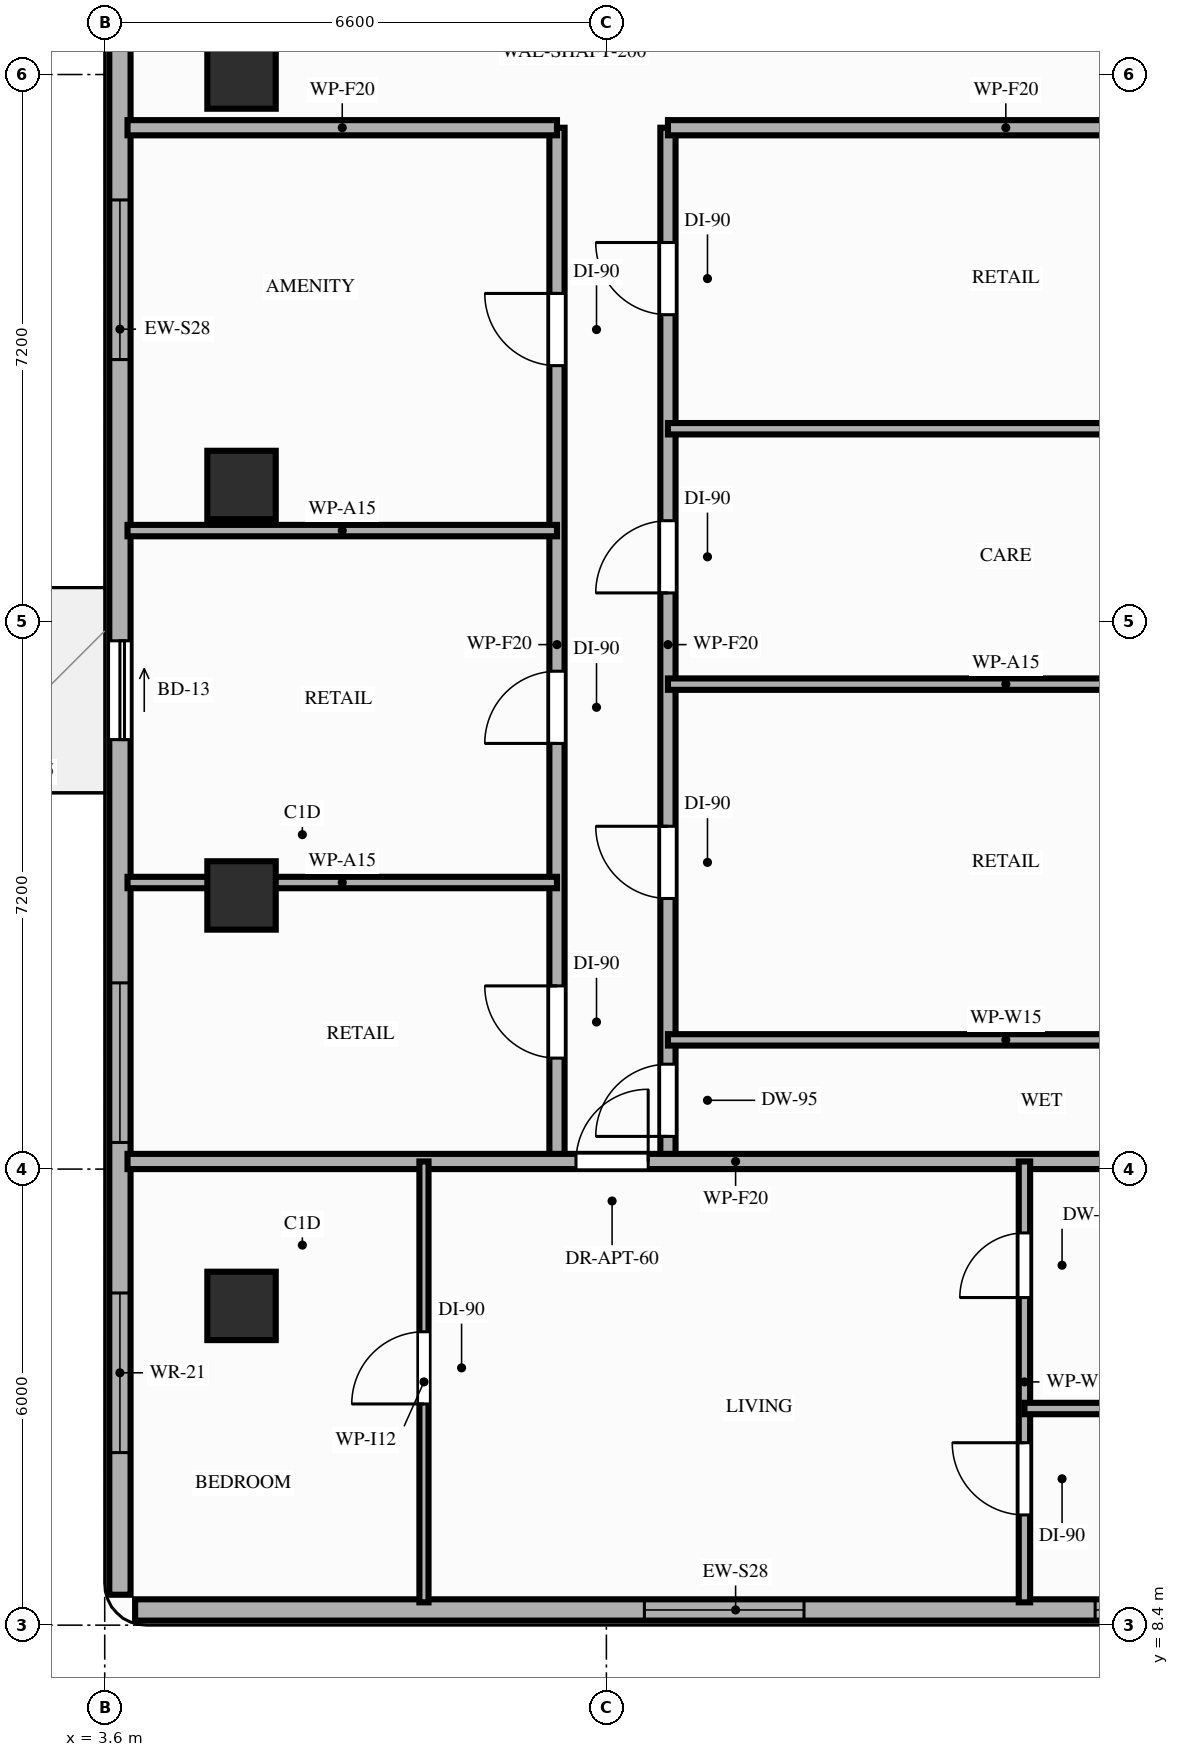
"""IFC4 building model, lengths in metres.
Left out: names, types, materials, properties, quantities, classifications, styles, units other than length and angle.
Written with IfcOpenShell. Run it as: python <this file> out.ifc"""

import sys

from ifc_helpers import new_model, si_unit, direction, frame, frame_2d, origin, origin_2d, place, context, subcontext, project, spatial, rectangle, extrude, element, fill, save


model = new_model("IFC4")
c1 = context("Model", 3, precision=1e-05, world=origin(), true_north=direction((0.0, 1.0)))
c2 = subcontext(c1, "Body", "Model", "MODEL_VIEW")
j1 = project(units=[si_unit("LENGTHUNIT", "METRE"), si_unit("PLANEANGLEUNIT", "RADIAN")], contexts=[c1])
p1 = place(None, origin())
s1 = spatial("IfcSite", under=j1, at=p1, CompositionType="ELEMENT")
p2 = place(p1, origin())
s2 = spatial("IfcBuilding", under=s1, at=p2, CompositionType="ELEMENT")
p3 = place(p2, frame((0.0, 0.0, 195.2)))
s3 = spatial("IfcBuildingStorey", under=s2, at=p3, CompositionType="ELEMENT", Elevation=195.2)
for number, where, z_axis, x_axis in (
    (1, (5.4, 12.6, 0.0), (0.0, 0.0, 1.0), (1.0, 0.0, 0.0)),
    (2, (5.4, 18.0, 0.0), (0.0, 0.0, 1.0), (1.0, 0.0, 0.0)),
    (3, (5.4, 23.4, 0.0), (0.0, 0.0, 1.0), (1.0, 0.0, 0.0)),
    (4, (5.4, 28.8, 0.0), (0.0, 0.0, 1.0), (1.0, 0.0, 0.0)),
):
    element("IfcColumn", number, at=place(p3, frame(where, z_axis=z_axis, x_axis=x_axis)), inside=s3, PredefinedType="COLUMN", context=c2, shape_type="SweptSolid", body=[
        extrude(rectangle(XDim=0.9, YDim=0.9, at=origin_2d()), origin(), (0.0, 0.0, 1.0), 3.2),
    ])
p4 = place(p3, frame((4.0, 8.6, 0.0), z_axis=(0.0, 0.0, 1.0), x_axis=(1.0, 0.0, 0.0)))
e5 = element("IfcWall", 5, at=p4, inside=s3, PredefinedType="STANDARD", context=c2, shape_type="SweptSolid", body=[
    extrude(rectangle(XDim=15.8, YDim=0.28, at=frame_2d((7.9, 0.0))), origin(), (0.0, 0.0, 1.0), 3.02),
])
p5 = place(p4, frame((6.7, 0.0, 0.85)))
e6 = element("IfcOpeningElement", 6, at=p5, cuts=e5, PredefinedType="OPENING", context=c2, shape_type="SweptSolid", body=[
    extrude(rectangle(XDim=2.1, YDim=1.8, at=frame_2d((1.05, 0.9))), frame((0.0, 0.15, 0.0), z_axis=(0.0, -1.0, 0.0), x_axis=(1.0, 0.0, 0.0)), (0.0, 0.0, 1.0), 0.3),
])
p6 = place(p4, frame((12.63, 0.0, 0.85)))
e7 = element("IfcOpeningElement", 7, at=p6, cuts=e5, PredefinedType="OPENING", context=c2, shape_type="SweptSolid", body=[
    extrude(rectangle(XDim=2.1, YDim=1.8, at=frame_2d((1.05, 0.9))), frame((0.0, 0.15, 0.0), z_axis=(0.0, -1.0, 0.0), x_axis=(1.0, 0.0, 0.0)), (0.0, 0.0, 1.0), 0.3),
])
p7 = place(p3, frame((3.8, 42.1, 0.0), z_axis=(0.0, 0.0, 1.0), x_axis=(0.0, -1.0, 0.0)))
e8 = element("IfcWall", 8, at=p7, inside=s3, PredefinedType="STANDARD", context=c2, shape_type="SweptSolid", body=[
    extrude(rectangle(XDim=33.3, YDim=0.28, at=frame_2d((16.65, 0.0))), origin(), (0.0, 0.0, 1.0), 2.71),
])
p8 = place(p7, frame((20.75, 0.0, 0.0)))
e9 = element("IfcOpeningElement", 9, at=p8, cuts=e8, PredefinedType="OPENING", context=c2, shape_type="SweptSolid", body=[
    extrude(rectangle(XDim=1.3, YDim=2.08, at=frame_2d((0.65, 1.04))), frame((0.0, 0.15, 0.0), z_axis=(0.0, -1.0, 0.0), x_axis=(1.0, 0.0, 0.0)), (0.0, 0.0, 1.0), 0.3),
])
p9 = place(p7, frame((29.33, 0.0, 0.85)))
e10 = element("IfcOpeningElement", 10, at=p9, cuts=e8, PredefinedType="OPENING", context=c2, shape_type="SweptSolid", body=[
    extrude(rectangle(XDim=2.1, YDim=1.61, at=frame_2d((1.05, 0.805))), frame((0.0, 0.15, 0.0), z_axis=(0.0, -1.0, 0.0), x_axis=(1.0, 0.0, 0.0)), (0.0, 0.0, 1.0), 0.3),
])
p10 = place(p7, frame((25.25, 0.0, 0.85)))
e11 = element("IfcOpeningElement", 11, at=p10, cuts=e8, PredefinedType="OPENING", context=c2, shape_type="SweptSolid", body=[
    extrude(rectangle(XDim=2.1, YDim=1.61, at=frame_2d((1.05, 0.805))), frame((0.0, 0.15, 0.0), z_axis=(0.0, -1.0, 0.0), x_axis=(1.0, 0.0, 0.0)), (0.0, 0.0, 1.0), 0.3),
])
p11 = place(p7, frame((14.95, 0.0, 0.85)))
e12 = element("IfcOpeningElement", 12, at=p11, cuts=e8, PredefinedType="OPENING", context=c2, shape_type="SweptSolid", body=[
    extrude(rectangle(XDim=2.1, YDim=1.61, at=frame_2d((1.05, 0.805))), frame((0.0, 0.15, 0.0), z_axis=(0.0, -1.0, 0.0), x_axis=(1.0, 0.0, 0.0)), (0.0, 0.0, 1.0), 0.3),
])
p12 = place(p7, frame((9.75, 0.0, 0.85)))
e13 = element("IfcOpeningElement", 13, at=p12, cuts=e8, PredefinedType="OPENING", context=c2, shape_type="SweptSolid", body=[
    extrude(rectangle(XDim=2.1, YDim=1.61, at=frame_2d((1.05, 0.805))), frame((0.0, 0.15, 0.0), z_axis=(0.0, -1.0, 0.0), x_axis=(1.0, 0.0, 0.0)), (0.0, 0.0, 1.0), 0.3),
])
p13 = place(p7, frame((3.65, 0.0, 0.85)))
e14 = element("IfcOpeningElement", 14, at=p13, cuts=e8, PredefinedType="OPENING", context=c2, shape_type="SweptSolid", body=[
    extrude(rectangle(XDim=2.1, YDim=1.61, at=frame_2d((1.05, 0.805))), frame((0.0, 0.15, 0.0), z_axis=(0.0, -1.0, 0.0), x_axis=(1.0, 0.0, 0.0)), (0.0, 0.0, 1.0), 0.3),
])
p14 = place(p3, frame((9.55, 14.5, 0.0), z_axis=(0.0, 0.0, 1.0), x_axis=(0.0, 1.0, 0.0)))
e15 = element("IfcWall", 15, at=p14, inside=s3, PredefinedType="PARTITIONING", context=c2, shape_type="SweptSolid", body=[
    extrude(rectangle(XDim=13.6, YDim=0.2, at=frame_2d((6.8, 0.0))), origin(), (0.0, 0.0, 1.0), 2.51),
])
p15 = place(p14, frame((1.36, 0.0, 0.0)))
e16 = element("IfcOpeningElement", 16, at=p15, cuts=e15, PredefinedType="OPENING", context=c2, shape_type="SweptSolid", body=[
    extrude(rectangle(XDim=0.95, YDim=2.15, at=frame_2d((0.475, 1.075))), frame((0.0, 0.11, 0.0), z_axis=(0.0, -1.0, 0.0), x_axis=(1.0, 0.0, 0.0)), (0.0, 0.0, 1.0), 0.22),
])
p16 = place(p14, frame((5.5, 0.0, 0.0)))
e17 = element("IfcOpeningElement", 17, at=p16, cuts=e15, PredefinedType="OPENING", context=c2, shape_type="SweptSolid", body=[
    extrude(rectangle(XDim=0.95, YDim=2.15, at=frame_2d((0.475, 1.075))), frame((0.0, 0.11, 0.0), z_axis=(0.0, -1.0, 0.0), x_axis=(1.0, 0.0, 0.0)), (0.0, 0.0, 1.0), 0.22),
])
p17 = place(p14, frame((10.47, 0.0, 0.0)))
e18 = element("IfcOpeningElement", 18, at=p17, cuts=e15, PredefinedType="OPENING", context=c2, shape_type="SweptSolid", body=[
    extrude(rectangle(XDim=0.95, YDim=2.15, at=frame_2d((0.475, 1.075))), frame((0.0, 0.11, 0.0), z_axis=(0.0, -1.0, 0.0), x_axis=(1.0, 0.0, 0.0)), (0.0, 0.0, 1.0), 0.22),
])
p18 = place(p3, frame((11.01, 14.5, 0.0), z_axis=(0.0, 0.0, 1.0), x_axis=(0.0, 1.0, 0.0)))
e19 = element("IfcWall", 19, at=p18, inside=s3, PredefinedType="PARTITIONING", context=c2, shape_type="SweptSolid", body=[
    extrude(rectangle(XDim=13.6, YDim=0.2, at=frame_2d((6.8, 0.0))), origin(), (0.0, 0.0, 1.0), 2.51),
])
p19 = place(p18, frame((0.33, 0.0, 0.0)))
e20 = element("IfcOpeningElement", 20, at=p19, cuts=e19, PredefinedType="OPENING", context=c2, shape_type="SweptSolid", body=[
    extrude(rectangle(XDim=0.95, YDim=2.1, at=frame_2d((0.475, 1.05))), frame((0.0, 0.11, 0.0), z_axis=(0.0, -1.0, 0.0), x_axis=(1.0, 0.0, 0.0)), (0.0, 0.0, 1.0), 0.22),
])
p20 = place(p18, frame((3.46, 0.0, 0.0)))
e21 = element("IfcOpeningElement", 21, at=p20, cuts=e19, PredefinedType="OPENING", context=c2, shape_type="SweptSolid", body=[
    extrude(rectangle(XDim=0.95, YDim=2.15, at=frame_2d((0.475, 1.075))), frame((0.0, 0.11, 0.0), z_axis=(0.0, -1.0, 0.0), x_axis=(1.0, 0.0, 0.0)), (0.0, 0.0, 1.0), 0.22),
])
p21 = place(p18, frame((7.48, 0.0, 0.0)))
e22 = element("IfcOpeningElement", 22, at=p21, cuts=e19, PredefinedType="OPENING", context=c2, shape_type="SweptSolid", body=[
    extrude(rectangle(XDim=0.95, YDim=2.15, at=frame_2d((0.475, 1.075))), frame((0.0, 0.11, 0.0), z_axis=(0.0, -1.0, 0.0), x_axis=(1.0, 0.0, 0.0)), (0.0, 0.0, 1.0), 0.22),
])
p22 = place(p18, frame((11.14, 0.0, 0.0)))
e23 = element("IfcOpeningElement", 23, at=p22, cuts=e19, PredefinedType="OPENING", context=c2, shape_type="SweptSolid", body=[
    extrude(rectangle(XDim=0.95, YDim=2.15, at=frame_2d((0.475, 1.075))), frame((0.0, 0.11, 0.0), z_axis=(0.0, -1.0, 0.0), x_axis=(1.0, 0.0, 0.0)), (0.0, 0.0, 1.0), 0.22),
])
p23 = place(p3, frame((3.9, 14.5, 0.0), z_axis=(0.0, 0.0, 1.0), x_axis=(1.0, 0.0, 0.0)))
e24 = element("IfcWall", 24, at=p23, inside=s3, PredefinedType="PARTITIONING", context=c2, shape_type="SweptSolid", body=[
    extrude(rectangle(XDim=16.0, YDim=0.2, at=frame_2d((8.0, 0.0))), origin(), (0.0, 0.0, 1.0), 2.51),
])
p24 = place(p23, frame((5.9, 0.0, 0.0)))
e25 = element("IfcOpeningElement", 25, at=p24, cuts=e24, PredefinedType="OPENING", context=c2, shape_type="SweptSolid", body=[
    extrude(rectangle(XDim=0.95, YDim=2.15, at=frame_2d((0.475, 1.075))), frame((0.0, 0.11, 0.0), z_axis=(0.0, -1.0, 0.0), x_axis=(1.0, 0.0, 0.0)), (0.0, 0.0, 1.0), 0.22),
])
p25 = place(p3, frame((3.9, 28.1, 0.0), z_axis=(0.0, 0.0, 1.0), x_axis=(1.0, 0.0, 0.0)))
e26 = element("IfcWall", 26, at=p25, inside=s3, PredefinedType="PARTITIONING", context=c2, shape_type="SweptSolid", body=[
    extrude(rectangle(XDim=5.65, YDim=0.2, at=frame_2d((2.825, 0.0))), origin(), (0.0, 0.0, 1.0), 2.51),
])
p26 = place(p3, frame((11.01, 28.1, 0.0), z_axis=(0.0, 0.0, 1.0), x_axis=(1.0, 0.0, 0.0)))
e27 = element("IfcWall", 27, at=p26, inside=s3, PredefinedType="PARTITIONING", context=c2, shape_type="SweptSolid", body=[
    extrude(rectangle(XDim=8.89, YDim=0.2, at=frame_2d((4.445, 0.0))), origin(), (0.0, 0.0, 1.0), 2.51),
])
p27 = place(p3, frame((7.8, 8.7, 0.0), z_axis=(0.0, 0.0, 1.0), x_axis=(0.0, 1.0, 0.0)))
e28 = element("IfcWall", 28, at=p27, inside=s3, PredefinedType="PARTITIONING", context=c2, shape_type="SweptSolid", body=[
    extrude(rectangle(XDim=5.8, YDim=0.12, at=frame_2d((2.9, 0.0))), origin(), (0.0, 0.0, 1.0), 2.51),
])
p28 = place(p27, frame((2.61, 0.0, 0.0)))
e29 = element("IfcOpeningElement", 29, at=p28, cuts=e28, PredefinedType="OPENING", context=c2, shape_type="SweptSolid", body=[
    extrude(rectangle(XDim=0.95, YDim=2.15, at=frame_2d((0.475, 1.075))), frame((0.0, 0.07, 0.0), z_axis=(0.0, -1.0, 0.0), x_axis=(1.0, 0.0, 0.0)), (0.0, 0.0, 1.0), 0.14),
])
p29 = place(p3, frame((15.7, 8.7, 0.0), z_axis=(0.0, 0.0, 1.0), x_axis=(0.0, 1.0, 0.0)))
e30 = element("IfcWall", 30, at=p29, inside=s3, PredefinedType="PARTITIONING", context=c2, shape_type="SweptSolid", body=[
    extrude(rectangle(XDim=5.8, YDim=0.15, at=frame_2d((2.9, 0.0))), origin(), (0.0, 0.0, 1.0), 2.51),
])
p30 = place(p29, frame((1.15, 0.0, 0.0)))
e31 = element("IfcOpeningElement", 31, at=p30, cuts=e30, PredefinedType="OPENING", context=c2, shape_type="SweptSolid", body=[
    extrude(rectangle(XDim=0.95, YDim=2.15, at=frame_2d((0.475, 1.075))), frame((0.0, 0.085, 0.0), z_axis=(0.0, -1.0, 0.0), x_axis=(1.0, 0.0, 0.0)), (0.0, 0.0, 1.0), 0.17),
])
p31 = place(p29, frame((4.01, 0.0, 0.0)))
e32 = element("IfcOpeningElement", 32, at=p31, cuts=e30, PredefinedType="OPENING", context=c2, shape_type="SweptSolid", body=[
    extrude(rectangle(XDim=0.85, YDim=2.1, at=frame_2d((0.425, 1.05))), frame((0.0, 0.085, 0.0), z_axis=(0.0, -1.0, 0.0), x_axis=(1.0, 0.0, 0.0)), (0.0, 0.0, 1.0), 0.17),
])
p32 = place(p3, frame((15.7, 11.25, 0.0), z_axis=(0.0, 0.0, 1.0), x_axis=(1.0, 0.0, 0.0)))
e33 = element("IfcWall", 33, at=p32, inside=s3, PredefinedType="PARTITIONING", context=c2, shape_type="SweptSolid", body=[
    extrude(rectangle(XDim=4.2, YDim=0.15, at=frame_2d((2.1, 0.0))), origin(), (0.0, 0.0, 1.0), 3.02),
])
for number, where, z_axis, x_axis in (
    (34, (3.9, 18.17, 0.0), (0.0, 0.0, 1.0), (1.0, 0.0, 0.0)),
    (35, (3.9, 22.8, 0.0), (0.0, 0.0, 1.0), (1.0, 0.0, 0.0)),
):
    element("IfcWall", number, at=place(p3, frame(where, z_axis=z_axis, x_axis=x_axis)), inside=s3, PredefinedType="PARTITIONING", context=c2, shape_type="SweptSolid", body=[
        extrude(rectangle(XDim=5.65, YDim=0.15, at=frame_2d((2.825, 0.0))), origin(), (0.0, 0.0, 1.0), 2.51),
    ])
for number, where, z_axis, x_axis in (
    (36, (11.01, 16.1, 0.0), (0.0, 0.0, 1.0), (1.0, 0.0, 0.0)),
    (37, (11.01, 20.78, 0.0), (0.0, 0.0, 1.0), (1.0, 0.0, 0.0)),
    (38, (11.01, 24.14, 0.0), (0.0, 0.0, 1.0), (1.0, 0.0, 0.0)),
):
    element("IfcWall", number, at=place(p3, frame(where, z_axis=z_axis, x_axis=x_axis)), inside=s3, PredefinedType="PARTITIONING", context=c2, shape_type="SweptSolid", body=[
        extrude(rectangle(XDim=8.89, YDim=0.15, at=frame_2d((4.445, 0.0))), origin(), (0.0, 0.0, 1.0), 2.51),
    ])
p33 = place(p8, origin())
e39 = element("IfcDoor", 39, at=p33, inside=s3, OperationType="SLIDING_TO_LEFT", PredefinedType="DOOR", context=c2, shape_type="SweptSolid", body=[
    extrude(rectangle(XDim=1.3, YDim=2.08, at=frame_2d((0.65, 1.04))), frame((0.0, 0.025, 0.0), z_axis=(0.0, -1.0, 0.0), x_axis=(1.0, 0.0, 0.0)), (0.0, 0.0, 1.0), 0.05),
])
fill(e9, e39)
p34 = place(p9, origin())
e40 = element("IfcWindow", 40, at=p34, inside=s3, PartitioningType="SINGLE_PANEL", PredefinedType="WINDOW", context=c2, shape_type="SweptSolid", body=[
    extrude(rectangle(XDim=2.1, YDim=1.61, at=frame_2d((1.05, 0.805))), frame((0.0, 0.03, 0.0), z_axis=(0.0, -1.0, 0.0), x_axis=(1.0, 0.0, 0.0)), (0.0, 0.0, 1.0), 0.06),
])
fill(e10, e40)
p35 = place(p5, origin())
e41 = element("IfcWindow", 41, at=p35, inside=s3, PartitioningType="SINGLE_PANEL", PredefinedType="WINDOW", context=c2, shape_type="SweptSolid", body=[
    extrude(rectangle(XDim=2.1, YDim=1.8, at=frame_2d((1.05, 0.9))), frame((0.0, 0.03, 0.0), z_axis=(0.0, -1.0, 0.0), x_axis=(1.0, 0.0, 0.0)), (0.0, 0.0, 1.0), 0.06),
])
fill(e6, e41)
p36 = place(p6, origin())
e42 = element("IfcWindow", 42, at=p36, inside=s3, PartitioningType="SINGLE_PANEL", PredefinedType="WINDOW", context=c2, shape_type="SweptSolid", body=[
    extrude(rectangle(XDim=2.1, YDim=1.8, at=frame_2d((1.05, 0.9))), frame((0.0, 0.03, 0.0), z_axis=(0.0, -1.0, 0.0), x_axis=(1.0, 0.0, 0.0)), (0.0, 0.0, 1.0), 0.06),
])
fill(e7, e42)
p37 = place(p10, origin())
e43 = element("IfcWindow", 43, at=p37, inside=s3, PartitioningType="SINGLE_PANEL", PredefinedType="WINDOW", context=c2, shape_type="SweptSolid", body=[
    extrude(rectangle(XDim=2.1, YDim=1.61, at=frame_2d((1.05, 0.805))), frame((0.0, 0.03, 0.0), z_axis=(0.0, -1.0, 0.0), x_axis=(1.0, 0.0, 0.0)), (0.0, 0.0, 1.0), 0.06),
])
fill(e11, e43)
p38 = place(p11, origin())
e44 = element("IfcWindow", 44, at=p38, inside=s3, PartitioningType="SINGLE_PANEL", PredefinedType="WINDOW", context=c2, shape_type="SweptSolid", body=[
    extrude(rectangle(XDim=2.1, YDim=1.61, at=frame_2d((1.05, 0.805))), frame((0.0, 0.03, 0.0), z_axis=(0.0, -1.0, 0.0), x_axis=(1.0, 0.0, 0.0)), (0.0, 0.0, 1.0), 0.06),
])
fill(e12, e44)
p39 = place(p24, origin())
e45 = element("IfcDoor", 45, at=p39, inside=s3, OperationType="SINGLE_SWING_RIGHT", PredefinedType="DOOR", context=c2, shape_type="SweptSolid", body=[
    extrude(rectangle(XDim=0.95, YDim=2.15, at=frame_2d((0.475, 1.075))), frame((0.0, 0.025, 0.0), z_axis=(0.0, -1.0, 0.0), x_axis=(1.0, 0.0, 0.0)), (0.0, 0.0, 1.0), 0.05),
])
fill(e25, e45)
p40 = place(p28, origin())
e46 = element("IfcDoor", 46, at=p40, inside=s3, OperationType="SINGLE_SWING_LEFT", PredefinedType="DOOR", context=c2, shape_type="SweptSolid", body=[
    extrude(rectangle(XDim=0.95, YDim=2.15, at=frame_2d((0.475, 1.075))), frame((0.0, 0.025, 0.0), z_axis=(0.0, -1.0, 0.0), x_axis=(1.0, 0.0, 0.0)), (0.0, 0.0, 1.0), 0.05),
])
fill(e29, e46)
p41 = place(p30, origin())
e47 = element("IfcDoor", 47, at=p41, inside=s3, OperationType="SINGLE_SWING_RIGHT", PredefinedType="DOOR", context=c2, shape_type="SweptSolid", body=[
    extrude(rectangle(XDim=0.95, YDim=2.15, at=frame_2d((0.475, 1.075))), frame((0.0, 0.025, 0.0), z_axis=(0.0, -1.0, 0.0), x_axis=(1.0, 0.0, 0.0)), (0.0, 0.0, 1.0), 0.05),
])
fill(e31, e47)
p42 = place(p31, origin())
e48 = element("IfcDoor", 48, at=p42, inside=s3, OperationType="SINGLE_SWING_LEFT", PredefinedType="DOOR", context=c2, shape_type="SweptSolid", body=[
    extrude(rectangle(XDim=0.85, YDim=2.1, at=frame_2d((0.425, 1.05))), frame((0.0, 0.025, 0.0), z_axis=(0.0, -1.0, 0.0), x_axis=(1.0, 0.0, 0.0)), (0.0, 0.0, 1.0), 0.05),
])
fill(e32, e48)
p43 = place(p15, origin())
e49 = element("IfcDoor", 49, at=p43, inside=s3, OperationType="SINGLE_SWING_RIGHT", PredefinedType="DOOR", context=c2, shape_type="SweptSolid", body=[
    extrude(rectangle(XDim=0.95, YDim=2.15, at=frame_2d((0.475, 1.075))), frame((0.0, 0.025, 0.0), z_axis=(0.0, -1.0, 0.0), x_axis=(1.0, 0.0, 0.0)), (0.0, 0.0, 1.0), 0.05),
])
fill(e16, e49)
p44 = place(p16, origin())
e50 = element("IfcDoor", 50, at=p44, inside=s3, OperationType="SINGLE_SWING_LEFT", PredefinedType="DOOR", context=c2, shape_type="SweptSolid", body=[
    extrude(rectangle(XDim=0.95, YDim=2.15, at=frame_2d((0.475, 1.075))), frame((0.0, 0.025, 0.0), z_axis=(0.0, -1.0, 0.0), x_axis=(1.0, 0.0, 0.0)), (0.0, 0.0, 1.0), 0.05),
])
fill(e17, e50)
p45 = place(p17, origin())
e51 = element("IfcDoor", 51, at=p45, inside=s3, OperationType="SINGLE_SWING_RIGHT", PredefinedType="DOOR", context=c2, shape_type="SweptSolid", body=[
    extrude(rectangle(XDim=0.95, YDim=2.15, at=frame_2d((0.475, 1.075))), frame((0.0, 0.025, 0.0), z_axis=(0.0, -1.0, 0.0), x_axis=(1.0, 0.0, 0.0)), (0.0, 0.0, 1.0), 0.05),
])
fill(e18, e51)
p46 = place(p19, origin())
e52 = element("IfcDoor", 52, at=p46, inside=s3, OperationType="SINGLE_SWING_LEFT", PredefinedType="DOOR", context=c2, shape_type="SweptSolid", body=[
    extrude(rectangle(XDim=0.95, YDim=2.1, at=frame_2d((0.475, 1.05))), frame((0.0, 0.025, 0.0), z_axis=(0.0, -1.0, 0.0), x_axis=(1.0, 0.0, 0.0)), (0.0, 0.0, 1.0), 0.05),
])
fill(e20, e52)
p47 = place(p20, origin())
e53 = element("IfcDoor", 53, at=p47, inside=s3, OperationType="SINGLE_SWING_RIGHT", PredefinedType="DOOR", context=c2, shape_type="SweptSolid", body=[
    extrude(rectangle(XDim=0.95, YDim=2.15, at=frame_2d((0.475, 1.075))), frame((0.0, 0.025, 0.0), z_axis=(0.0, -1.0, 0.0), x_axis=(1.0, 0.0, 0.0)), (0.0, 0.0, 1.0), 0.05),
])
fill(e21, e53)
p48 = place(p21, origin())
e54 = element("IfcDoor", 54, at=p48, inside=s3, OperationType="SINGLE_SWING_LEFT", PredefinedType="DOOR", context=c2, shape_type="SweptSolid", body=[
    extrude(rectangle(XDim=0.95, YDim=2.15, at=frame_2d((0.475, 1.075))), frame((0.0, 0.025, 0.0), z_axis=(0.0, -1.0, 0.0), x_axis=(1.0, 0.0, 0.0)), (0.0, 0.0, 1.0), 0.05),
])
fill(e22, e54)
p49 = place(p22, origin())
e55 = element("IfcDoor", 55, at=p49, inside=s3, OperationType="SINGLE_SWING_RIGHT", PredefinedType="DOOR", context=c2, shape_type="SweptSolid", body=[
    extrude(rectangle(XDim=0.95, YDim=2.15, at=frame_2d((0.475, 1.075))), frame((0.0, 0.025, 0.0), z_axis=(0.0, -1.0, 0.0), x_axis=(1.0, 0.0, 0.0)), (0.0, 0.0, 1.0), 0.05),
])
fill(e23, e55)
save(model, sys.argv[1])
